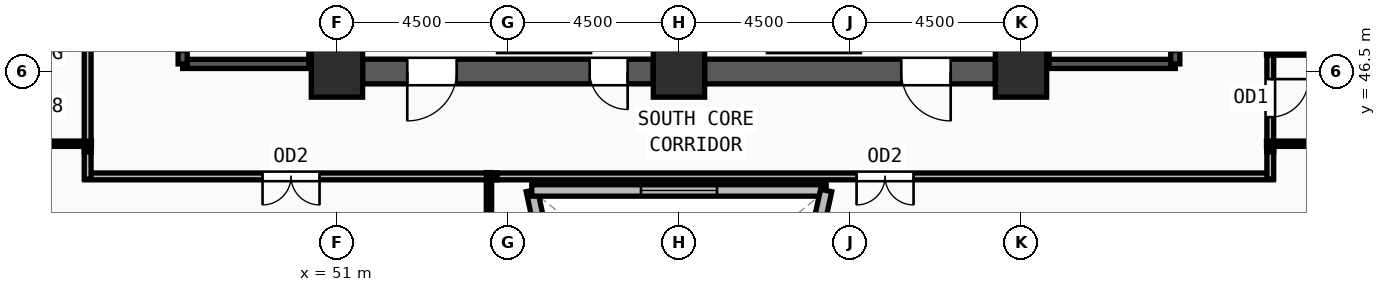
"""IFC4 building model, lengths in metres.
Left out: names, types, materials, properties, quantities, classifications, styles, units other than length and angle.
Written with IfcOpenShell. Run it as: python <this file> out.ifc"""

import sys

from ifc_helpers import new_model, si_unit, direction, frame, frame_2d, origin, origin_2d, place, context, subcontext, project, spatial, rectangle, extrude, source, transform, mapped, element, fill, save


model = new_model("IFC4")
c1 = context("Model", 3, precision=1e-05, world=origin(), true_north=direction((0.0, 1.0)))
c2 = subcontext(c1, "Body", "Model", "MODEL_VIEW")
j1 = project(units=[si_unit("LENGTHUNIT", "METRE"), si_unit("PLANEANGLEUNIT", "RADIAN")], contexts=[c1])
p1 = place(None, origin())
s1 = spatial("IfcSite", under=j1, at=p1, CompositionType="ELEMENT")
p2 = place(p1, origin())
s2 = spatial("IfcBuilding", under=s1, at=p2, CompositionType="ELEMENT")
p3 = place(p2, frame((0.0, 0.0, 194.25)))
s3 = spatial("IfcBuildingStorey", under=s2, at=p3, CompositionType="ELEMENT", Elevation=194.25)
m1 = source(origin(), c2, "Body", "SweptSolid", [
    extrude(rectangle(XDim=1.35, YDim=1.35, at=origin_2d()), origin(), (0.0, 0.0, 1.0), 3.75),
])
for number, where, z_axis, x_axis in (
    (1, (51.0, 46.5, 0.0), (0.0, 0.0, 1.0), (1.0, 0.0, 0.0)),
    (2, (60.0, 46.5, 0.0), (0.0, 0.0, 1.0), (1.0, 0.0, 0.0)),
    (3, (69.0, 46.5, 0.0), (0.0, 0.0, 1.0), (1.0, 0.0, 0.0)),
):
    element("IfcColumn", number, at=place(p3, frame(where, z_axis=z_axis, x_axis=x_axis)), inside=s3, PredefinedType="COLUMN", context=c2, shape_type="MappedRepresentation", body=[
        mapped(m1, transform((0.0, 0.0, 0.0), x_axis=(1.0, 0.0, 0.0), y_axis=(0.0, 1.0, 0.0), z_axis=(0.0, 0.0, 1.0), scale=1.0)),
    ])
p4 = place(p3, frame((37.541, 43.351, 0.0), z_axis=(0.0, 0.0, 1.0), x_axis=(0.551978948994, -0.833858045394, 0.0)))
e4 = element("IfcWall", 4, at=p4, inside=s3, PredefinedType="SOLIDWALL", context=c2, shape_type="SweptSolid", body=[
    extrude(rectangle(XDim=29.97, YDim=0.38, at=frame_2d((14.985, 0.0))), origin(), (0.0, 0.0, 1.0), 3.57),
])
m2 = source(origin(), c2, "Body", "SweptSolid", [
    extrude(rectangle(XDim=1.5, YDim=1.9, at=frame_2d((0.75, 0.95))), frame((0.0, 0.2, 0.0), z_axis=(0.0, -1.0, 0.0), x_axis=(1.0, 0.0, 0.0)), (0.0, 0.0, 1.0), 0.4),
])
p5 = place(p4, frame((6.743, 0.0, 0.55)))
e5 = element("IfcOpeningElement", 5, at=p5, cuts=e4, PredefinedType="OPENING", context=c2, shape_type="MappedRepresentation", body=[
    mapped(m2, transform((0.0, 0.0, 0.0), x_axis=(1.0, 0.0, 0.0), y_axis=(0.0, 1.0, 0.0), z_axis=(0.0, 0.0, 1.0), scale=1.0)),
])
p6 = place(p4, frame((14.235, 0.0, 0.55)))
e6 = element("IfcOpeningElement", 6, at=p6, cuts=e4, PredefinedType="OPENING", context=c2, shape_type="MappedRepresentation", body=[
    mapped(m2, transform((0.0, 0.0, 0.0), x_axis=(1.0, 0.0, 0.0), y_axis=(0.0, 1.0, 0.0), z_axis=(0.0, 0.0, 1.0), scale=1.0)),
])
p7 = place(p4, frame((21.728, 0.0, 0.55)))
e7 = element("IfcOpeningElement", 7, at=p7, cuts=e4, PredefinedType="OPENING", context=c2, shape_type="MappedRepresentation", body=[
    mapped(m2, transform((0.0, 0.0, 0.0), x_axis=(1.0, 0.0, 0.0), y_axis=(0.0, 1.0, 0.0), z_axis=(0.0, 0.0, 1.0), scale=1.0)),
])
p8 = place(p3, frame((68.325, 46.5, 0.0), z_axis=(0.0, 0.0, 1.0), x_axis=(-1.0, 0.0, 0.0)))
e8 = element("IfcWall", 8, at=p8, inside=s3, PredefinedType="SHEAR", context=c2, shape_type="SweptSolid", body=[
    extrude(rectangle(XDim=7.65, YDim=0.65, at=frame_2d((3.825, 0.0))), origin(), (0.0, 0.0, 1.0), 3.57),
])
m3 = source(origin(), c2, "Body", "SweptSolid", [
    extrude(rectangle(XDim=1.3, YDim=2.2, at=frame_2d((0.65, 1.1))), frame((0.0, 0.335, 0.0), z_axis=(0.0, -1.0, 0.0), x_axis=(1.0, 0.0, 0.0)), (0.0, 0.0, 1.0), 0.67),
])
p9 = place(p8, frame((1.175, 0.0, 0.0)))
e9 = element("IfcOpeningElement", 9, at=p9, cuts=e8, PredefinedType="OPENING", context=c2, shape_type="MappedRepresentation", body=[
    mapped(m3, transform((0.0, 0.0, 0.0), x_axis=(1.0, 0.0, 0.0), y_axis=(0.0, 1.0, 0.0), z_axis=(0.0, 0.0, 1.0), scale=1.0)),
])
p10 = place(p3, frame((59.325, 46.5, 0.0), z_axis=(0.0, 0.0, 1.0), x_axis=(-1.0, 0.0, 0.0)))
e10 = element("IfcWall", 10, at=p10, inside=s3, PredefinedType="SHEAR", context=c2, shape_type="SweptSolid", body=[
    extrude(rectangle(XDim=7.65, YDim=0.65, at=frame_2d((3.825, 0.0))), origin(), (0.0, 0.0, 1.0), 3.57),
])
p11 = place(p10, frame((5.175, 0.0, 0.0)))
e11 = element("IfcOpeningElement", 11, at=p11, cuts=e10, PredefinedType="OPENING", context=c2, shape_type="MappedRepresentation", body=[
    mapped(m3, transform((0.0, 0.0, 0.0), x_axis=(1.0, 0.0, 0.0), y_axis=(0.0, 1.0, 0.0), z_axis=(0.0, 0.0, 1.0), scale=1.0)),
])
m4 = source(origin(), c2, "Body", "SweptSolid", [
    extrude(rectangle(XDim=1.0, YDim=2.2, at=frame_2d((0.5, 1.1))), frame((0.0, 0.335, 0.0), z_axis=(0.0, -1.0, 0.0), x_axis=(1.0, 0.0, 0.0)), (0.0, 0.0, 1.0), 0.67),
])
p12 = place(p10, frame((0.675, 0.0, 0.0)))
e12 = element("IfcOpeningElement", 12, at=p12, cuts=e10, PredefinedType="OPENING", context=c2, shape_type="MappedRepresentation", body=[
    mapped(m4, transform((0.0, 0.0, 0.0), x_axis=(1.0, 0.0, 0.0), y_axis=(0.0, 1.0, 0.0), z_axis=(0.0, 0.0, 1.0), scale=1.0)),
])
p13 = place(p3, frame((46.94, 46.7, 0.0), z_axis=(0.0, 0.0, 1.0), x_axis=(1.0, 0.0, 0.0)))
e13 = element("IfcWall", 13, at=p13, inside=s3, PredefinedType="SOLIDWALL", context=c2, shape_type="SweptSolid", body=[
    extrude(rectangle(XDim=3.44, YDim=0.24, at=frame_2d((1.72, 0.0))), origin(), (0.0, 0.0, 1.0), 3.57),
])
p14 = place(p3, frame((50.38, 46.7, 0.0), z_axis=(0.0, 0.0, 1.0), x_axis=(0.0, 1.0, 0.0)))
e14 = element("IfcWall", 14, at=p14, inside=s3, PredefinedType="SOLIDWALL", context=c2, shape_type="SweptSolid", body=[
    extrude(rectangle(XDim=7.82, YDim=0.24, at=frame_2d((3.91, 0.0))), origin(), (0.0, 0.0, 1.0), 3.57),
])
p15 = place(p3, frame((46.94, 54.52, 0.0), z_axis=(0.0, 0.0, 1.0), x_axis=(0.0, -1.0, 0.0)))
e15 = element("IfcWall", 15, at=p15, inside=s3, PredefinedType="SOLIDWALL", context=c2, shape_type="SweptSolid", body=[
    extrude(rectangle(XDim=7.82, YDim=0.24, at=frame_2d((3.91, 0.0))), origin(), (0.0, 0.0, 1.0), 3.57),
])
m5 = source(origin(), c2, "Body", "SweptSolid", [
    extrude(rectangle(XDim=1.2, YDim=2.2, at=frame_2d((0.6, 1.1))), frame((0.0, 0.13, 0.0), z_axis=(0.0, -1.0, 0.0), x_axis=(1.0, 0.0, 0.0)), (0.0, 0.0, 1.0), 0.26),
])
p16 = place(p15, frame((6.3, 0.0, 0.0)))
e16 = element("IfcOpeningElement", 16, at=p16, cuts=e15, PredefinedType="OPENING", context=c2, shape_type="MappedRepresentation", body=[
    mapped(m5, transform((0.0, 0.0, 0.0), x_axis=(1.0, 0.0, 0.0), y_axis=(0.0, 1.0, 0.0), z_axis=(0.0, 0.0, 1.0), scale=1.0)),
])
p17 = place(p3, frame((69.62, 46.7, 0.0), z_axis=(0.0, 0.0, 1.0), x_axis=(1.0, 0.0, 0.0)))
e17 = element("IfcWall", 17, at=p17, inside=s3, PredefinedType="SOLIDWALL", context=c2, shape_type="SweptSolid", body=[
    extrude(rectangle(XDim=3.44, YDim=0.24, at=frame_2d((1.72, 0.0))), origin(), (0.0, 0.0, 1.0), 3.57),
])
p18 = place(p3, frame((73.06, 46.7, 0.0), z_axis=(0.0, 0.0, 1.0), x_axis=(0.0, 1.0, 0.0)))
e18 = element("IfcWall", 18, at=p18, inside=s3, PredefinedType="SOLIDWALL", context=c2, shape_type="SweptSolid", body=[
    extrude(rectangle(XDim=7.82, YDim=0.24, at=frame_2d((3.91, 0.0))), origin(), (0.0, 0.0, 1.0), 3.57),
])
p19 = place(p18, frame((0.32, 0.0, 0.0)))
e19 = element("IfcOpeningElement", 19, at=p19, cuts=e18, PredefinedType="OPENING", context=c2, shape_type="MappedRepresentation", body=[
    mapped(m5, transform((0.0, 0.0, 0.0), x_axis=(1.0, 0.0, 0.0), y_axis=(0.0, 1.0, 0.0), z_axis=(0.0, 0.0, 1.0), scale=1.0)),
])
p20 = place(p3, frame((69.62, 54.52, 0.0), z_axis=(0.0, 0.0, 1.0), x_axis=(0.0, -1.0, 0.0)))
e20 = element("IfcWall", 20, at=p20, inside=s3, PredefinedType="SOLIDWALL", context=c2, shape_type="SweptSolid", body=[
    extrude(rectangle(XDim=7.82, YDim=0.24, at=frame_2d((3.91, 0.0))), origin(), (0.0, 0.0, 1.0), 3.57),
])
p21 = place(p3, frame((57.483, 37.1, 0.0), z_axis=(0.0, 0.0, 1.0), x_axis=(-0.211374063876, 0.977405240993, 0.0)))
e21 = element("IfcWall", 21, at=p21, inside=s3, PredefinedType="SOLIDWALL", context=c2, shape_type="SweptSolid", body=[
    extrude(rectangle(XDim=6.415, YDim=0.3, at=frame_2d((3.208, 0.0))), origin(), (0.0, 0.0, 1.0), 3.57),
])
m6 = source(origin(), c2, "Body", "SweptSolid", [
    extrude(rectangle(XDim=2.0, YDim=1.9, at=frame_2d((1.0, 0.95))), frame((0.0, 0.16, 0.0), z_axis=(0.0, -1.0, 0.0), x_axis=(1.0, 0.0, 0.0)), (0.0, 0.0, 1.0), 0.32),
])
p22 = place(p21, frame((2.207, 0.0, 0.55)))
e22 = element("IfcOpeningElement", 22, at=p22, cuts=e21, PredefinedType="OPENING", context=c2, shape_type="MappedRepresentation", body=[
    mapped(m6, transform((0.0, 0.0, 0.0), x_axis=(1.0, 0.0, 0.0), y_axis=(0.0, 1.0, 0.0), z_axis=(0.0, 0.0, 1.0), scale=1.0)),
])
p23 = place(p3, frame((56.127, 43.37, 0.0), z_axis=(0.0, 0.0, 1.0), x_axis=(1.0, 0.0, 0.0)))
e23 = element("IfcWall", 23, at=p23, inside=s3, PredefinedType="SOLIDWALL", context=c2, shape_type="SweptSolid", body=[
    extrude(rectangle(XDim=7.746, YDim=0.3, at=frame_2d((3.873, 0.0))), origin(), (0.0, 0.0, 1.0), 3.57),
])
p24 = place(p23, frame((2.873, 0.0, 0.55)))
e24 = element("IfcOpeningElement", 24, at=p24, cuts=e23, PredefinedType="OPENING", context=c2, shape_type="MappedRepresentation", body=[
    mapped(m6, transform((0.0, 0.0, 0.0), x_axis=(1.0, 0.0, 0.0), y_axis=(0.0, 1.0, 0.0), z_axis=(0.0, 0.0, 1.0), scale=1.0)),
])
p25 = place(p3, frame((63.873, 43.37, 0.0), z_axis=(0.0, 0.0, 1.0), x_axis=(-0.211374063876, -0.977405240993, 0.0)))
e25 = element("IfcWall", 25, at=p25, inside=s3, PredefinedType="SOLIDWALL", context=c2, shape_type="SweptSolid", body=[
    extrude(rectangle(XDim=6.415, YDim=0.3, at=frame_2d((3.208, 0.0))), origin(), (0.0, 0.0, 1.0), 3.57),
])
p26 = place(p25, frame((2.207, 0.0, 0.55)))
e26 = element("IfcOpeningElement", 26, at=p26, cuts=e25, PredefinedType="OPENING", context=c2, shape_type="MappedRepresentation", body=[
    mapped(m6, transform((0.0, 0.0, 0.0), x_axis=(1.0, 0.0, 0.0), y_axis=(0.0, 1.0, 0.0), z_axis=(0.0, 0.0, 1.0), scale=1.0)),
])
p27 = place(p3, frame((55.215, 43.74, 0.0), z_axis=(0.0, 0.0, 1.0), x_axis=(-1.0, 0.0, 0.0)))
e27 = element("IfcWall", 27, at=p27, inside=s3, PredefinedType="PARTITIONING", context=c2, shape_type="SweptSolid", body=[
    extrude(rectangle(XDim=10.845, YDim=0.18, at=frame_2d((5.422, 0.0))), origin(), (0.0, 0.0, 1.0), 3.57),
])
m7 = source(origin(), c2, "Body", "SweptSolid", [
    extrude(rectangle(XDim=1.5, YDim=2.2, at=frame_2d((0.75, 1.1))), frame((0.0, 0.1, 0.0), z_axis=(0.0, -1.0, 0.0), x_axis=(1.0, 0.0, 0.0)), (0.0, 0.0, 1.0), 0.2),
])
p28 = place(p27, frame((4.673, 0.0, 0.0)))
e28 = element("IfcOpeningElement", 28, at=p28, cuts=e27, PredefinedType="OPENING", context=c2, shape_type="MappedRepresentation", body=[
    mapped(m7, transform((0.0, 0.0, 0.0), x_axis=(1.0, 0.0, 0.0), y_axis=(0.0, 1.0, 0.0), z_axis=(0.0, 0.0, 1.0), scale=1.0)),
])
p29 = place(p3, frame((75.63, 43.74, 0.0), z_axis=(0.0, 0.0, 1.0), x_axis=(-1.0, 0.0, 0.0)))
e29 = element("IfcWall", 29, at=p29, inside=s3, PredefinedType="PARTITIONING", context=c2, shape_type="SweptSolid", body=[
    extrude(rectangle(XDim=20.415, YDim=0.18, at=frame_2d((10.208, 0.0))), origin(), (0.0, 0.0, 1.0), 3.57),
])
p30 = place(p29, frame((9.457, 0.0, 0.0)))
e30 = element("IfcOpeningElement", 30, at=p30, cuts=e29, PredefinedType="OPENING", context=c2, shape_type="MappedRepresentation", body=[
    mapped(m7, transform((0.0, 0.0, 0.0), x_axis=(1.0, 0.0, 0.0), y_axis=(0.0, 1.0, 0.0), z_axis=(0.0, 0.0, 1.0), scale=1.0)),
])
p31 = place(p3, frame((75.56, 47.215, 0.0), z_axis=(0.0, 0.0, 1.0), x_axis=(0.0, -1.0, 0.0)))
e31 = element("IfcWall", 31, at=p31, inside=s3, PredefinedType="PARTITIONING", context=c2, shape_type="SweptSolid", body=[
    extrude(rectangle(XDim=2.83, YDim=0.18, at=frame_2d((1.415, 0.0))), origin(), (0.0, 0.0, 1.0), 3.57),
])
m8 = source(origin(), c2, "Body", "SweptSolid", [
    extrude(rectangle(XDim=1.0, YDim=2.2, at=frame_2d((0.5, 1.1))), frame((0.0, 0.1, 0.0), z_axis=(0.0, -1.0, 0.0), x_axis=(1.0, 0.0, 0.0)), (0.0, 0.0, 1.0), 0.2),
])
p32 = place(p31, frame((0.915, 0.0, 0.0)))
e32 = element("IfcOpeningElement", 32, at=p32, cuts=e31, PredefinedType="OPENING", context=c2, shape_type="MappedRepresentation", body=[
    mapped(m8, transform((0.0, 0.0, 0.0), x_axis=(1.0, 0.0, 0.0), y_axis=(0.0, 1.0, 0.0), z_axis=(0.0, 0.0, 1.0), scale=1.0)),
])
p33 = place(p3, frame((44.44, 44.385, 0.0), z_axis=(0.0, 0.0, 1.0), x_axis=(0.0, 1.0, 0.0)))
e33 = element("IfcWall", 33, at=p33, inside=s3, PredefinedType="PARTITIONING", context=c2, shape_type="SweptSolid", body=[
    extrude(rectangle(XDim=3.825, YDim=0.18, at=frame_2d((1.913, 0.0))), origin(), (0.0, 0.0, 1.0), 3.205),
])
for number, where, z_axis, x_axis in (
    (34, (44.44, 43.67, 0.0), (0.0, 0.0, 1.0), (0.0, 1.0, 0.0)),
    (35, (75.56, 44.385, 0.0), (0.0, 0.0, 1.0), (0.0, -1.0, 0.0)),
):
    element("IfcWall", number, at=place(p3, frame(where, z_axis=z_axis, x_axis=x_axis)), inside=s3, PredefinedType="PARTITIONING", context=c2, shape_type="SweptSolid", body=[
        extrude(rectangle(XDim=0.715, YDim=0.18, at=frame_2d((0.357, 0.0))), origin(), (0.0, 0.0, 1.0), 3.57),
    ])
p34 = place(p3, frame((44.54, 44.6, 0.0), z_axis=(0.0, 0.0, 1.0), x_axis=(-1.0, 0.0, 0.0)))
e36 = element("IfcWall", 36, at=p34, inside=s3, PredefinedType="PARTITIONING", context=c2, shape_type="SweptSolid", body=[
    extrude(rectangle(XDim=8.394, YDim=0.14, at=frame_2d((4.197, 0.0))), origin(), (0.0, 0.0, 1.0), 3.57),
])
p35 = place(p3, frame((75.46, 44.6, 0.0), z_axis=(0.0, 0.0, 1.0), x_axis=(1.0, 0.0, 0.0)))
e37 = element("IfcWall", 37, at=p35, inside=s3, PredefinedType="PARTITIONING", context=c2, shape_type="SweptSolid", body=[
    extrude(rectangle(XDim=8.051, YDim=0.14, at=frame_2d((4.025, 0.0))), origin(), (0.0, 0.0, 1.0), 3.57),
])
p36 = place(p3, frame((75.46, 47.0, 0.0), z_axis=(0.0, 0.0, 1.0), x_axis=(1.0, 0.0, 0.0)))
e38 = element("IfcWall", 38, at=p36, inside=s3, PredefinedType="PARTITIONING", context=c2, shape_type="SweptSolid", body=[
    extrude(rectangle(XDim=9.248, YDim=0.14, at=frame_2d((4.624, 0.0))), origin(), (0.0, 0.0, 1.0), 3.57),
])
p37 = place(p3, frame((55.0, 43.84, 0.0), z_axis=(0.0, 0.0, 1.0), x_axis=(0.0, -1.0, 0.0)))
e39 = element("IfcWall", 39, at=p37, inside=s3, PredefinedType="PARTITIONING", context=c2, shape_type="SweptSolid", body=[
    extrude(rectangle(XDim=26.501, YDim=0.14, at=frame_2d((13.25, 0.0))), origin(), (0.0, 0.0, 1.0), 3.57),
])
m9 = source(origin(), c2, "Body", "SweptSolid", [
    extrude(rectangle(XDim=1.3, YDim=2.2, at=frame_2d((0.65, 1.1))), frame((0.0, 0.025, 0.0), z_axis=(0.0, -1.0, 0.0), x_axis=(1.0, 0.0, 0.0)), (0.0, 0.0, 1.0), 0.05),
])
p38 = place(p11, origin())
e40 = element("IfcDoor", 40, at=p38, inside=s3, OperationType="SINGLE_SWING_RIGHT", PredefinedType="DOOR", context=c2, shape_type="MappedRepresentation", body=[
    mapped(m9, transform((0.0, 0.0, 0.0), x_axis=(1.0, 0.0, 0.0), y_axis=(0.0, 1.0, 0.0), z_axis=(0.0, 0.0, 1.0), scale=1.0)),
])
fill(e11, e40)
m10 = source(origin(), c2, "Body", "SweptSolid", [
    extrude(rectangle(XDim=1.0, YDim=2.2, at=frame_2d((0.5, 1.1))), frame((0.0, 0.025, 0.0), z_axis=(0.0, -1.0, 0.0), x_axis=(1.0, 0.0, 0.0)), (0.0, 0.0, 1.0), 0.05),
])
p39 = place(p12, origin())
e41 = element("IfcDoor", 41, at=p39, inside=s3, OperationType="SINGLE_SWING_LEFT", PredefinedType="DOOR", context=c2, shape_type="MappedRepresentation", body=[
    mapped(m10, transform((0.0, 0.0, 0.0), x_axis=(1.0, 0.0, 0.0), y_axis=(0.0, 1.0, 0.0), z_axis=(0.0, 0.0, 1.0), scale=1.0)),
])
fill(e12, e41)
p40 = place(p9, origin())
e42 = element("IfcDoor", 42, at=p40, inside=s3, OperationType="SINGLE_SWING_LEFT", PredefinedType="DOOR", context=c2, shape_type="MappedRepresentation", body=[
    mapped(m9, transform((0.0, 0.0, 0.0), x_axis=(1.0, 0.0, 0.0), y_axis=(0.0, 1.0, 0.0), z_axis=(0.0, 0.0, 1.0), scale=1.0)),
])
fill(e9, e42)
m11 = source(origin(), c2, "Body", "SweptSolid", [
    extrude(rectangle(XDim=2.0, YDim=1.9, at=frame_2d((1.0, 0.95))), frame((0.0, 0.03, 0.0), z_axis=(0.0, -1.0, 0.0), x_axis=(1.0, 0.0, 0.0)), (0.0, 0.0, 1.0), 0.06),
])
p41 = place(p24, origin())
e43 = element("IfcWindow", 43, at=p41, inside=s3, PartitioningType="DOUBLE_PANEL_VERTICAL", PredefinedType="WINDOW", context=c2, shape_type="MappedRepresentation", body=[
    mapped(m11, transform((0.0, 0.0, 0.0), x_axis=(1.0, 0.0, 0.0), y_axis=(0.0, 1.0, 0.0), z_axis=(0.0, 0.0, 1.0), scale=1.0)),
])
fill(e24, e43)
m12 = source(origin(), c2, "Body", "SweptSolid", [
    extrude(rectangle(XDim=1.5, YDim=2.2, at=frame_2d((0.75, 1.1))), frame((0.0, 0.025, 0.0), z_axis=(0.0, -1.0, 0.0), x_axis=(1.0, 0.0, 0.0)), (0.0, 0.0, 1.0), 0.05),
])
p42 = place(p28, origin())
e44 = element("IfcDoor", 44, at=p42, inside=s3, OperationType="DOUBLE_DOOR_SINGLE_SWING", PredefinedType="DOOR", context=c2, shape_type="MappedRepresentation", body=[
    mapped(m12, transform((0.0, 0.0, 0.0), x_axis=(1.0, 0.0, 0.0), y_axis=(0.0, 1.0, 0.0), z_axis=(0.0, 0.0, 1.0), scale=1.0)),
])
fill(e28, e44)
p43 = place(p30, origin())
e45 = element("IfcDoor", 45, at=p43, inside=s3, OperationType="DOUBLE_DOOR_SINGLE_SWING", PredefinedType="DOOR", context=c2, shape_type="MappedRepresentation", body=[
    mapped(m12, transform((0.0, 0.0, 0.0), x_axis=(1.0, 0.0, 0.0), y_axis=(0.0, 1.0, 0.0), z_axis=(0.0, 0.0, 1.0), scale=1.0)),
])
fill(e30, e45)
p44 = place(p32, origin())
e46 = element("IfcDoor", 46, at=p44, inside=s3, OperationType="SINGLE_SWING_LEFT", PredefinedType="DOOR", context=c2, shape_type="MappedRepresentation", body=[
    mapped(m10, transform((0.0, 0.0, 0.0), x_axis=(1.0, 0.0, 0.0), y_axis=(0.0, 1.0, 0.0), z_axis=(0.0, 0.0, 1.0), scale=1.0)),
])
fill(e32, e46)
save(model, sys.argv[1])
